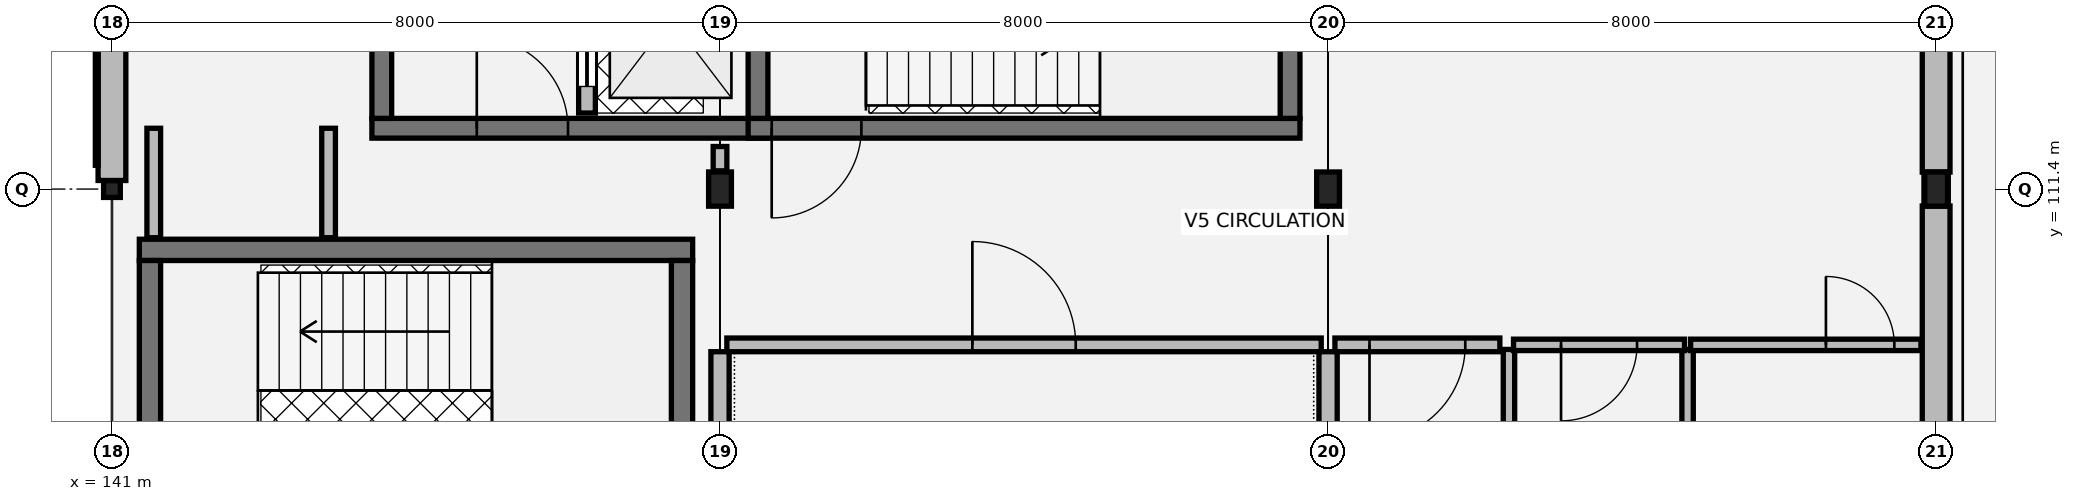
"""IFC4 building model, lengths in metres.
Left out: names, types, materials, properties, quantities, classifications, styles, units other than length and angle.
Written with IfcOpenShell. Run it as: python <this file> out.ifc"""

import sys

from ifc_helpers import new_model, si_unit, direction, frame, frame_2d, origin, origin_2d, place, context, subcontext, project, spatial, rectangle, hollow_rectangle, i_section, extrude, element, fill, save


model = new_model("IFC4")
c1 = context("Model", 3, precision=1e-05, world=origin(), true_north=direction((0.0, 1.0)))
c2 = subcontext(c1, "Body", "Model", "MODEL_VIEW")
j1 = project(units=[si_unit("LENGTHUNIT", "METRE"), si_unit("PLANEANGLEUNIT", "RADIAN")], contexts=[c1])
p1 = place(None, origin())
s1 = spatial("IfcSite", under=j1, at=p1, CompositionType="ELEMENT")
p2 = place(p1, origin())
s2 = spatial("IfcBuilding", under=s1, at=p2, CompositionType="ELEMENT")
p3 = place(p2, frame((0.0, 0.0, 13.26)))
s3 = spatial("IfcBuildingStorey", under=s2, at=p3, CompositionType="ELEMENT", Elevation=13.26)
p4 = place(p3, frame((141.0, 111.4, 0.0), z_axis=(0.0, 0.0, 1.0), x_axis=(1.0, 0.0, 0.0)))
e1 = element("IfcColumn", 1, at=p4, inside=s3, PredefinedType="COLUMN", context=c2, shape_type="SweptSolid", body=[
    extrude(hollow_rectangle(XDim=0.22, YDim=0.22, WallThickness=0.01, at=origin_2d()), origin(), (0.0, 0.0, 1.0), 4.055),
])
for number, where, z_axis, x_axis in (
    (2, (149.0, 111.4, 0.0), (0.0, 0.0, 1.0), (1.0, 0.0, 0.0)),
    (3, (157.0, 111.4, 0.0), (0.0, 0.0, 1.0), (1.0, 0.0, 0.0)),
):
    element("IfcColumn", number, at=place(p3, frame(where, z_axis=z_axis, x_axis=x_axis)), inside=s3, PredefinedType="COLUMN", context=c2, shape_type="SweptSolid", body=[
        extrude(i_section(OverallWidth=0.3, OverallDepth=0.45, WebThickness=0.014, FlangeThickness=0.026, at=origin_2d()), origin(), (0.0, 0.0, 1.0), 4.055),
    ])
p5 = place(p3, frame((165.0, 111.4, 0.0), z_axis=(0.0, 0.0, 1.0), x_axis=(1.0, 0.0, 0.0)))
e4 = element("IfcColumn", 4, at=p5, inside=s3, PredefinedType="COLUMN", context=c2, shape_type="SweptSolid", body=[
    extrude(i_section(OverallWidth=0.3, OverallDepth=0.45, WebThickness=0.014, FlangeThickness=0.026, at=origin_2d()), origin(), (0.0, 0.0, 1.0), 3.85),
])
p6 = place(p3, frame((165.0, 104.023, 0.0), z_axis=(0.0, 0.0, 1.0), x_axis=(0.0, 1.0, 0.0)))
e5 = element("IfcWall", 5, at=p6, inside=s3, PredefinedType="SOLIDWALL", context=c2, shape_type="SweptSolid", body=[
    extrude(rectangle(XDim=7.154, YDim=0.365, at=frame_2d((3.577, 0.0))), origin(), (0.0, 0.0, 1.0), 3.27),
])
p7 = place(p3, frame((165.0, 111.623, 0.0), z_axis=(0.0, 0.0, 1.0), x_axis=(0.0, 1.0, 0.0)))
e6 = element("IfcWall", 6, at=p7, inside=s3, PredefinedType="SOLIDWALL", context=c2, shape_type="SweptSolid", body=[
    extrude(rectangle(XDim=7.264, YDim=0.365, at=frame_2d((3.632, 0.0))), origin(), (0.0, 0.0, 1.0), 3.27),
])
p8 = place(p7, frame((3.007, 0.0, 0.0)))
e7 = element("IfcOpeningElement", 7, at=p8, cuts=e6, PredefinedType="OPENING", context=c2, shape_type="SweptSolid", body=[
    extrude(rectangle(XDim=1.25, YDim=2.2, at=frame_2d((0.625, 1.1))), frame((0.0, 0.192, 0.0), z_axis=(0.0, -1.0, 0.0), x_axis=(1.0, 0.0, 0.0)), (0.0, 0.0, 1.0), 0.385),
])
p9 = place(p3, frame((141.0, 118.887, 0.0), z_axis=(0.0, 0.0, 1.0), x_axis=(0.0, -1.0, 0.0)))
e8 = element("IfcWall", 8, at=p9, inside=s3, PredefinedType="SOLIDWALL", context=c2, shape_type="SweptSolid", body=[
    extrude(rectangle(XDim=7.374, YDim=0.365, at=frame_2d((3.687, 0.0))), origin(), (0.0, 0.0, 1.0), 3.48),
])
p10 = place(p9, frame((2.412, 0.0, 0.8)))
e9 = element("IfcOpeningElement", 9, at=p10, cuts=e8, PredefinedType="OPENING", context=c2, shape_type="SweptSolid", body=[
    extrude(rectangle(XDim=0.95, YDim=2.0, at=frame_2d((0.475, 1.0))), frame((0.0, 0.192, 0.0), z_axis=(0.0, -1.0, 0.0), x_axis=(1.0, 0.0, 0.0)), (0.0, 0.0, 1.0), 0.385),
])
p11 = place(p9, frame((4.012, 0.0, 0.8)))
e10 = element("IfcOpeningElement", 10, at=p11, cuts=e8, PredefinedType="OPENING", context=c2, shape_type="SweptSolid", body=[
    extrude(rectangle(XDim=0.95, YDim=2.0, at=frame_2d((0.475, 1.0))), frame((0.0, 0.192, 0.0), z_axis=(0.0, -1.0, 0.0), x_axis=(1.0, 0.0, 0.0)), (0.0, 0.0, 1.0), 0.385),
])
p12 = place(p3, frame((144.42, 112.2, 0.0), z_axis=(0.0, 0.0, 1.0), x_axis=(1.0, 0.0, 0.0)))
e11 = element("IfcWall", 11, at=p12, inside=s3, PredefinedType="SHEAR", context=c2, shape_type="SweptSolid", body=[
    extrude(rectangle(XDim=5.21, YDim=0.26, at=frame_2d((2.605, 0.0))), origin(), (0.0, 0.0, 1.0), 3.845),
])
p13 = place(p12, frame((1.38, 0.0, 0.0)))
e12 = element("IfcOpeningElement", 12, at=p13, cuts=e11, PredefinedType="OPENING", context=c2, shape_type="SweptSolid", body=[
    extrude(rectangle(XDim=1.2, YDim=2.16, at=frame_2d((0.6, 1.08))), frame((0.0, 0.14, 0.0), z_axis=(0.0, -1.0, 0.0), x_axis=(1.0, 0.0, 0.0)), (0.0, 0.0, 1.0), 0.28),
])
p14 = place(p3, frame((144.55, 118.07, 0.0), z_axis=(0.0, 0.0, 1.0), x_axis=(0.0, -1.0, 0.0)))
e13 = element("IfcWall", 13, at=p14, inside=s3, PredefinedType="SHEAR", context=c2, shape_type="SweptSolid", body=[
    extrude(rectangle(XDim=5.74, YDim=0.26, at=frame_2d((2.87, 0.0))), origin(), (0.0, 0.0, 1.0), 3.845),
])
p15 = place(p3, frame((147.25, 112.4, 0.0), z_axis=(0.0, 0.0, 1.0), x_axis=(0.0, 1.0, 0.0)))
e14 = element("IfcWall", 14, at=p15, inside=s3, PredefinedType="SOLIDWALL", context=c2, shape_type="SweptSolid", body=[
    extrude(rectangle(XDim=5.6, YDim=0.22, at=frame_2d((2.8, 0.0))), origin(), (0.0, 0.0, 1.0), 3.845),
])
p16 = place(p15, frame((0.35, 0.0, 0.0)))
e15 = element("IfcOpeningElement", 15, at=p16, cuts=e14, PredefinedType="OPENING", context=c2, shape_type="SweptSolid", body=[
    extrude(rectangle(XDim=1.1, YDim=2.15, at=frame_2d((0.55, 1.075))), frame((0.0, 0.12, 0.0), z_axis=(0.0, -1.0, 0.0), x_axis=(1.0, 0.0, 0.0)), (0.0, 0.0, 1.0), 0.24),
])
p17 = place(p15, frame((2.4, 0.0, 0.0)))
e16 = element("IfcOpeningElement", 16, at=p17, cuts=e14, PredefinedType="OPENING", context=c2, shape_type="SweptSolid", body=[
    extrude(rectangle(XDim=1.3, YDim=2.18, at=frame_2d((0.65, 1.09))), frame((0.0, 0.12, 0.0), z_axis=(0.0, -1.0, 0.0), x_axis=(1.0, 0.0, 0.0)), (0.0, 0.0, 1.0), 0.24),
])
p18 = place(p3, frame((149.37, 112.2, 0.0), z_axis=(0.0, 0.0, 1.0), x_axis=(1.0, 0.0, 0.0)))
e17 = element("IfcWall", 17, at=p18, inside=s3, PredefinedType="SHEAR", context=c2, shape_type="SweptSolid", body=[
    extrude(rectangle(XDim=7.26, YDim=0.26, at=frame_2d((3.63, 0.0))), origin(), (0.0, 0.0, 1.0), 3.845),
])
p19 = place(p18, frame((0.31, 0.0, 0.0)))
e18 = element("IfcOpeningElement", 18, at=p19, cuts=e17, PredefinedType="OPENING", context=c2, shape_type="SweptSolid", body=[
    extrude(rectangle(XDim=1.18, YDim=2.18, at=frame_2d((0.59, 1.09))), frame((0.0, 0.14, 0.0), z_axis=(0.0, -1.0, 0.0), x_axis=(1.0, 0.0, 0.0)), (0.0, 0.0, 1.0), 0.28),
])
for number, where, z_axis, x_axis in (
    (19, (149.5, 112.33, 0.0), (0.0, 0.0, 1.0), (0.0, 1.0, 0.0)),
    (20, (156.5, 112.33, 0.0), (0.0, 0.0, 1.0), (0.0, 1.0, 0.0)),
):
    element("IfcWall", number, at=place(p3, frame(where, z_axis=z_axis, x_axis=x_axis)), inside=s3, PredefinedType="SHEAR", context=c2, shape_type="SweptSolid", body=[
        extrude(rectangle(XDim=5.74, YDim=0.26, at=frame_2d((2.87, 0.0))), origin(), (0.0, 0.0, 1.0), 3.845),
    ])
p20 = place(p3, frame((141.36, 110.6, 0.0), z_axis=(0.0, 0.0, 1.0), x_axis=(1.0, 0.0, 0.0)))
e21 = element("IfcWall", 21, at=p20, inside=s3, PredefinedType="SHEAR", context=c2, shape_type="SweptSolid", body=[
    extrude(rectangle(XDim=7.28, YDim=0.28, at=frame_2d((3.64, 0.0))), origin(), (0.0, 0.0, 1.0), 3.845),
])
for number, where, z_axis, x_axis in (
    (22, (141.5, 104.74, 0.0), (0.0, 0.0, 1.0), (0.0, 1.0, 0.0)),
    (23, (148.5, 104.74, 0.0), (0.0, 0.0, 1.0), (0.0, 1.0, 0.0)),
):
    element("IfcWall", number, at=place(p3, frame(where, z_axis=z_axis, x_axis=x_axis)), inside=s3, PredefinedType="SHEAR", context=c2, shape_type="SweptSolid", body=[
        extrude(rectangle(XDim=5.72, YDim=0.28, at=frame_2d((2.86, 0.0))), origin(), (0.0, 0.0, 1.0), 3.845),
    ])
for number, where, z_axis, x_axis in (
    (24, (159.38, 106.93, 0.0), (0.0, 0.0, 1.0), (0.0, 1.0, 0.0)),
    (25, (161.73, 106.93, 0.0), (0.0, 0.0, 1.0), (0.0, 1.0, 0.0)),
):
    element("IfcWall", number, at=place(p3, frame(where, z_axis=z_axis, x_axis=x_axis)), inside=s3, PredefinedType="PARTITIONING", context=c2, shape_type="SweptSolid", body=[
        extrude(rectangle(XDim=2.36, YDim=0.15, at=frame_2d((1.18, 0.0))), origin(), (0.0, 0.0, 1.0), 3.18),
    ])
p21 = place(p3, frame((159.44, 109.35, 0.0), z_axis=(0.0, 0.0, 1.0), x_axis=(1.0, 0.0, 0.0)))
e26 = element("IfcWall", 26, at=p21, inside=s3, PredefinedType="PARTITIONING", context=c2, shape_type="SweptSolid", body=[
    extrude(rectangle(XDim=2.25, YDim=0.15, at=frame_2d((1.125, 0.0))), origin(), (0.0, 0.0, 1.0), 3.18),
])
p22 = place(p21, frame((0.625, 0.0, 0.0)))
e27 = element("IfcOpeningElement", 27, at=p22, cuts=e26, PredefinedType="OPENING", context=c2, shape_type="SweptSolid", body=[
    extrude(rectangle(XDim=1.0, YDim=2.15, at=frame_2d((0.5, 1.075))), frame((0.0, 0.085, 0.0), z_axis=(0.0, -1.0, 0.0), x_axis=(1.0, 0.0, 0.0)), (0.0, 0.0, 1.0), 0.17),
])
p23 = place(p3, frame((161.77, 109.35, 0.0), z_axis=(0.0, 0.0, 1.0), x_axis=(1.0, 0.0, 0.0)))
e28 = element("IfcWall", 28, at=p23, inside=s3, PredefinedType="PARTITIONING", context=c2, shape_type="SweptSolid", body=[
    extrude(rectangle(XDim=3.03, YDim=0.15, at=frame_2d((1.515, 0.0))), origin(), (0.0, 0.0, 1.0), 3.18),
])
p24 = place(p23, frame((1.78, 0.0, 0.0)))
e29 = element("IfcOpeningElement", 29, at=p24, cuts=e28, PredefinedType="OPENING", context=c2, shape_type="SweptSolid", body=[
    extrude(rectangle(XDim=0.9, YDim=2.15, at=frame_2d((0.45, 1.075))), frame((0.0, 0.085, 0.0), z_axis=(0.0, -1.0, 0.0), x_axis=(1.0, 0.0, 0.0)), (0.0, 0.0, 1.0), 0.17),
])
p25 = place(p3, frame((149.09, 109.35, 0.0), z_axis=(0.0, 0.0, 1.0), x_axis=(1.0, 0.0, 0.0)))
e30 = element("IfcWall", 30, at=p25, inside=s3, PredefinedType="PARTITIONING", context=c2, shape_type="SweptSolid", body=[
    extrude(rectangle(XDim=7.82, YDim=0.18, at=frame_2d((3.91, 0.0))), origin(), (0.0, 0.0, 1.0), 3.18),
])
p26 = place(p25, frame((3.23, 0.0, 0.0)))
e31 = element("IfcOpeningElement", 31, at=p26, cuts=e30, PredefinedType="OPENING", context=c2, shape_type="SweptSolid", body=[
    extrude(rectangle(XDim=1.36, YDim=2.2, at=frame_2d((0.68, 1.1))), frame((0.0, 0.1, 0.0), z_axis=(0.0, -1.0, 0.0), x_axis=(1.0, 0.0, 0.0)), (0.0, 0.0, 1.0), 0.2),
])
p27 = place(p3, frame((157.09, 109.35, 0.0), z_axis=(0.0, 0.0, 1.0), x_axis=(1.0, 0.0, 0.0)))
e32 = element("IfcWall", 32, at=p27, inside=s3, PredefinedType="PARTITIONING", context=c2, shape_type="SweptSolid", body=[
    extrude(rectangle(XDim=2.17, YDim=0.18, at=frame_2d((1.085, 0.0))), origin(), (0.0, 0.0, 1.0), 3.18),
])
p28 = place(p27, frame((0.455, 0.0, 0.0)))
e33 = element("IfcOpeningElement", 33, at=p28, cuts=e32, PredefinedType="OPENING", context=c2, shape_type="SweptSolid", body=[
    extrude(rectangle(XDim=1.26, YDim=2.2, at=frame_2d((0.63, 1.1))), frame((0.0, 0.1, 0.0), z_axis=(0.0, -1.0, 0.0), x_axis=(1.0, 0.0, 0.0)), (0.0, 0.0, 1.0), 0.2),
])
p29 = place(p3, frame((149.0, 111.64, 0.0), z_axis=(0.0, 0.0, 1.0), x_axis=(0.0, 1.0, 0.0)))
e34 = element("IfcWall", 34, at=p29, inside=s3, PredefinedType="PARTITIONING", context=c2, shape_type="SweptSolid", body=[
    extrude(rectangle(XDim=0.32, YDim=0.18, at=frame_2d((0.16, 0.0))), origin(), (0.0, 0.0, 1.0), 3.18),
])
for number, where, z_axis, x_axis in (
    (35, (141.55, 110.76, 0.0), (0.0, 0.0, 1.0), (0.0, 1.0, 0.0)),
    (36, (143.85, 110.76, 0.0), (0.0, 0.0, 1.0), (0.0, 1.0, 0.0)),
):
    element("IfcWall", number, at=place(p3, frame(where, z_axis=z_axis, x_axis=x_axis)), inside=s3, PredefinedType="PARTITIONING", context=c2, shape_type="SweptSolid", body=[
        extrude(rectangle(XDim=1.44, YDim=0.18, at=frame_2d((0.72, 0.0))), origin(), (0.0, 0.0, 1.0), 3.18),
    ])
p30 = place(p3, frame((149.0, 96.52, 0.0), z_axis=(0.0, 0.0, 1.0), x_axis=(0.0, 1.0, 0.0)))
e37 = element("IfcWall", 37, at=p30, inside=s3, PredefinedType="SOLIDWALL", context=c2, shape_type="SweptSolid", body=[
    extrude(rectangle(XDim=12.74, YDim=0.24, at=frame_2d((6.37, 0.0))), origin(), (0.0, 0.0, 1.0), 3.18),
])
p31 = place(p30, frame((4.82, 0.0, 0.0)))
e38 = element("IfcOpeningElement", 38, at=p31, cuts=e37, PredefinedType="OPENING", context=c2, shape_type="SweptSolid", body=[
    extrude(rectangle(XDim=1.3, YDim=2.2, at=frame_2d((0.65, 1.1))), frame((0.0, 0.13, 0.0), z_axis=(0.0, -1.0, 0.0), x_axis=(1.0, 0.0, 0.0)), (0.0, 0.0, 1.0), 0.26),
])
p32 = place(p3, frame((157.0, 96.52, 0.0), z_axis=(0.0, 0.0, 1.0), x_axis=(0.0, 1.0, 0.0)))
e39 = element("IfcWall", 39, at=p32, inside=s3, PredefinedType="SOLIDWALL", context=c2, shape_type="SweptSolid", body=[
    extrude(rectangle(XDim=12.74, YDim=0.24, at=frame_2d((6.37, 0.0))), origin(), (0.0, 0.0, 1.0), 3.18),
])
p33 = place(p13, origin())
e40 = element("IfcDoor", 40, at=p33, inside=s3, OperationType="SINGLE_SWING_LEFT", PredefinedType="DOOR", context=c2, shape_type="SweptSolid", body=[
    extrude(rectangle(XDim=1.2, YDim=2.16, at=frame_2d((0.6, 1.08))), frame((0.0, 0.025, 0.0), z_axis=(0.0, -1.0, 0.0), x_axis=(1.0, 0.0, 0.0)), (0.0, 0.0, 1.0), 0.05),
])
fill(e12, e40)
p34 = place(p16, origin())
e41 = element("IfcDoor", 41, at=p34, inside=s3, OperationType="SLIDING_TO_LEFT", PredefinedType="DOOR", context=c2, shape_type="SweptSolid", body=[
    extrude(rectangle(XDim=1.1, YDim=2.15, at=frame_2d((0.55, 1.075))), frame((0.0, 0.025, 0.0), z_axis=(0.0, -1.0, 0.0), x_axis=(1.0, 0.0, 0.0)), (0.0, 0.0, 1.0), 0.05),
])
fill(e15, e41)
p35 = place(p19, origin())
e42 = element("IfcDoor", 42, at=p35, inside=s3, OperationType="SINGLE_SWING_RIGHT", PredefinedType="DOOR", context=c2, shape_type="SweptSolid", body=[
    extrude(rectangle(XDim=1.18, YDim=2.18, at=frame_2d((0.59, 1.09))), frame((0.0, 0.025, 0.0), z_axis=(0.0, -1.0, 0.0), x_axis=(1.0, 0.0, 0.0)), (0.0, 0.0, 1.0), 0.05),
])
fill(e18, e42)
p36 = place(p22, origin())
e43 = element("IfcDoor", 43, at=p36, inside=s3, OperationType="SINGLE_SWING_RIGHT", PredefinedType="DOOR", context=c2, shape_type="SweptSolid", body=[
    extrude(rectangle(XDim=1.0, YDim=2.15, at=frame_2d((0.5, 1.075))), frame((0.0, 0.025, 0.0), z_axis=(0.0, -1.0, 0.0), x_axis=(1.0, 0.0, 0.0)), (0.0, 0.0, 1.0), 0.05),
])
fill(e27, e43)
p37 = place(p24, origin())
e44 = element("IfcDoor", 44, at=p37, inside=s3, OperationType="SINGLE_SWING_LEFT", PredefinedType="DOOR", context=c2, shape_type="SweptSolid", body=[
    extrude(rectangle(XDim=0.9, YDim=2.15, at=frame_2d((0.45, 1.075))), frame((0.0, 0.025, 0.0), z_axis=(0.0, -1.0, 0.0), x_axis=(1.0, 0.0, 0.0)), (0.0, 0.0, 1.0), 0.05),
])
fill(e29, e44)
p38 = place(p26, origin())
e45 = element("IfcDoor", 45, at=p38, inside=s3, OperationType="SINGLE_SWING_LEFT", PredefinedType="DOOR", context=c2, shape_type="SweptSolid", body=[
    extrude(rectangle(XDim=1.36, YDim=2.2, at=frame_2d((0.68, 1.1))), frame((0.0, 0.025, 0.0), z_axis=(0.0, -1.0, 0.0), x_axis=(1.0, 0.0, 0.0)), (0.0, 0.0, 1.0), 0.05),
])
fill(e31, e45)
p39 = place(p28, origin())
e46 = element("IfcDoor", 46, at=p39, inside=s3, OperationType="SINGLE_SWING_RIGHT", PredefinedType="DOOR", context=c2, shape_type="SweptSolid", body=[
    extrude(rectangle(XDim=1.26, YDim=2.2, at=frame_2d((0.63, 1.1))), frame((0.0, 0.025, 0.0), z_axis=(0.0, -1.0, 0.0), x_axis=(1.0, 0.0, 0.0)), (0.0, 0.0, 1.0), 0.05),
])
fill(e33, e46)
save(model, sys.argv[1])
